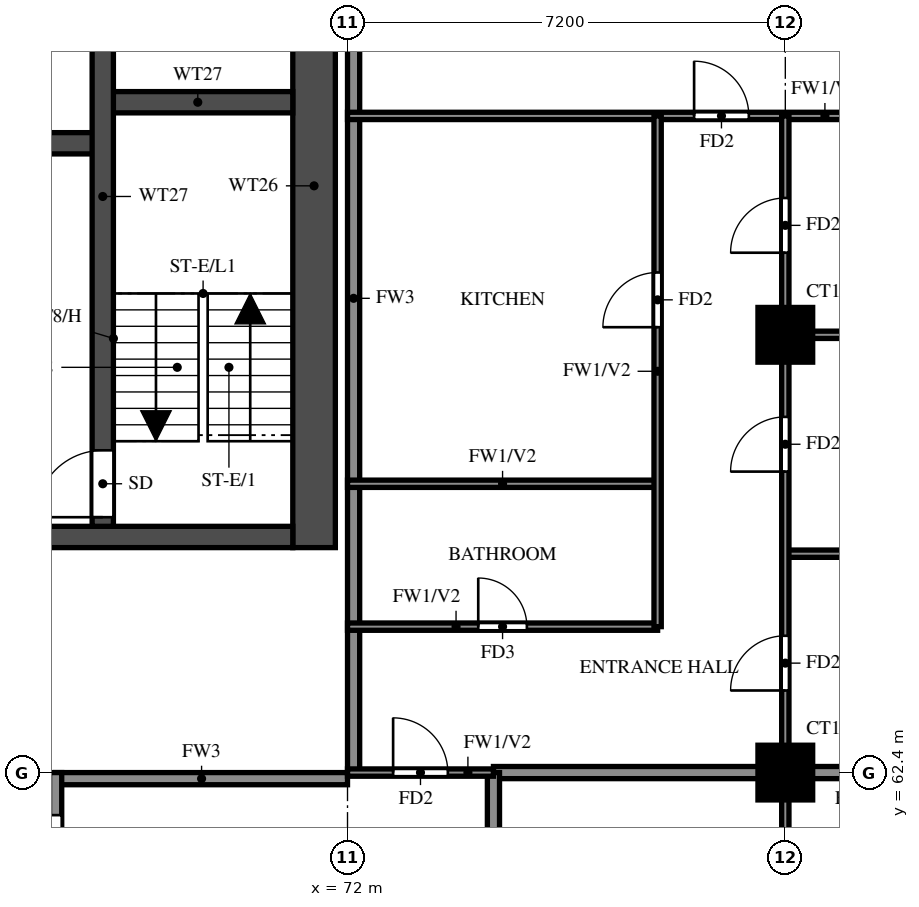
"""IFC4 building model, lengths in metres.
Left out: names, types, materials, properties, quantities, classifications, styles, units other than length and angle.
Written with IfcOpenShell. Run it as: python <this file> out.ifc"""

import sys

from ifc_helpers import new_model, si_unit, direction, frame, frame_2d, origin, origin_2d, place, context, subcontext, project, spatial, rectangle, extrude, source, transform, mapped, element, fill, save


model = new_model("IFC4")
c1 = context("Model", 3, precision=1e-05, world=origin(), true_north=direction((0.0, 1.0)))
c2 = subcontext(c1, "Body", "Model", "MODEL_VIEW")
j1 = project(units=[si_unit("LENGTHUNIT", "METRE"), si_unit("PLANEANGLEUNIT", "RADIAN")], contexts=[c1])
p1 = place(None, origin())
s1 = spatial("IfcSite", under=j1, at=p1, CompositionType="ELEMENT")
p2 = place(p1, origin())
s2 = spatial("IfcBuilding", under=s1, at=p2, CompositionType="ELEMENT")
p3 = place(p2, frame((0.0, 0.0, 192.0)))
s3 = spatial("IfcBuildingStorey", under=s2, at=p3, CompositionType="ELEMENT", Elevation=192.0)
m1 = source(origin(), c2, "Body", "SweptSolid", [
    extrude(rectangle(XDim=0.9, YDim=0.9, at=origin_2d()), origin(), (0.0, 0.0, 1.0), 3.2),
])
for number, where, z_axis, x_axis in (
    (1, (79.2, 62.4, 0.0), (0.0, 0.0, 1.0), (1.0, 0.0, 0.0)),
    (2, (79.2, 69.6, 0.0), (0.0, 0.0, 1.0), (1.0, 0.0, 0.0)),
):
    element("IfcColumn", number, at=place(p3, frame(where, z_axis=z_axis, x_axis=x_axis)), inside=s3, PredefinedType="COLUMN", context=c2, shape_type="MappedRepresentation", body=[
        mapped(m1, transform((0.0, 0.0, 0.0))),
    ])
p4 = place(p3, frame((71.45, 66.1, 0.0), z_axis=(0.0, 0.0, 1.0), x_axis=(0.0, 1.0, 0.0)))
e3 = element("IfcWall", 3, at=p4, inside=s3, PredefinedType="SHEAR", context=c2, shape_type="SweptSolid", body=[
    extrude(rectangle(XDim=11.9, YDim=0.7, at=frame_2d((5.95, 0.0))), origin(), (0.0, 0.0, 1.0), 3.2),
])
p5 = place(p3, frame((29.7, 66.275, 0.0), z_axis=(0.0, 0.0, 1.0), x_axis=(1.0, 0.0, 0.0)))
e4 = element("IfcWall", 4, at=p5, inside=s3, PredefinedType="SHEAR", context=c2, shape_type="SweptSolid", body=[
    extrude(rectangle(XDim=41.4, YDim=0.35, at=frame_2d((20.7, 0.0))), origin(), (0.0, 0.0, 1.0), 3.2),
])
p6 = place(p5, frame((0.925, 0.0, 0.0)))
e5 = element("IfcOpeningElement", 5, at=p6, cuts=e4, PredefinedType="OPENING", context=c2, shape_type="SweptSolid", body=[
    extrude(rectangle(XDim=1.1, YDim=2.1, at=frame_2d((0.55, 1.05))), frame((0.0, 0.185, 0.0), z_axis=(0.0, -1.0, 0.0), x_axis=(1.0, 0.0, 0.0)), (0.0, 0.0, 1.0), 0.37),
])
p7 = place(p5, frame((3.712, 0.0, 0.0)))
e6 = element("IfcOpeningElement", 6, at=p7, cuts=e4, PredefinedType="OPENING", context=c2, shape_type="SweptSolid", body=[
    extrude(rectangle(XDim=1.8, YDim=2.1, at=frame_2d((0.9, 1.05))), frame((0.0, 0.185, 0.0), z_axis=(0.0, -1.0, 0.0), x_axis=(1.0, 0.0, 0.0)), (0.0, 0.0, 1.0), 0.37),
])
p8 = place(p3, frame((32.825, 72.75, 0.0), z_axis=(0.0, 0.0, 1.0), x_axis=(1.0, 0.0, 0.0)))
e7 = element("IfcWall", 7, at=p8, inside=s3, PredefinedType="SHEAR", context=c2, shape_type="SweptSolid", body=[
    extrude(rectangle(XDim=35.15, YDim=0.35, at=frame_2d((17.575, 0.0))), origin(), (0.0, 0.0, 1.0), 3.2),
])
p9 = place(p8, frame((19.8, 0.0, 0.0)))
e8 = element("IfcOpeningElement", 8, at=p9, cuts=e7, PredefinedType="OPENING", context=c2, shape_type="SweptSolid", body=[
    extrude(rectangle(XDim=1.1, YDim=2.1, at=frame_2d((0.55, 1.05))), frame((0.0, 0.185, 0.0), z_axis=(0.0, -1.0, 0.0), x_axis=(1.0, 0.0, 0.0)), (0.0, 0.0, 1.0), 0.37),
])
p10 = place(p8, frame((27.7, 0.0, 0.0)))
e9 = element("IfcOpeningElement", 9, at=p10, cuts=e7, PredefinedType="OPENING", context=c2, shape_type="SweptSolid", body=[
    extrude(rectangle(XDim=1.1, YDim=2.1, at=frame_2d((0.55, 1.05))), frame((0.0, 0.185, 0.0), z_axis=(0.0, -1.0, 0.0), x_axis=(1.0, 0.0, 0.0)), (0.0, 0.0, 1.0), 0.37),
])
p11 = place(p8, frame((30.3, 0.0, 0.0)))
e10 = element("IfcOpeningElement", 10, at=p11, cuts=e7, PredefinedType="OPENING", context=c2, shape_type="SweptSolid", body=[
    extrude(rectangle(XDim=1.1, YDim=2.1, at=frame_2d((0.55, 1.05))), frame((0.0, 0.185, 0.0), z_axis=(0.0, -1.0, 0.0), x_axis=(1.0, 0.0, 0.0)), (0.0, 0.0, 1.0), 0.37),
])
p12 = place(p8, frame((3.8, 0.0, 0.0)))
e11 = element("IfcOpeningElement", 11, at=p12, cuts=e7, PredefinedType="OPENING", context=c2, shape_type="SweptSolid", body=[
    extrude(rectangle(XDim=1.1, YDim=2.1, at=frame_2d((0.55, 1.05))), frame((0.0, 0.185, 0.0), z_axis=(0.0, -1.0, 0.0), x_axis=(1.0, 0.0, 0.0)), (0.0, 0.0, 1.0), 0.37),
])
p13 = place(p8, frame((6.55, 0.0, 0.0)))
e12 = element("IfcOpeningElement", 12, at=p13, cuts=e7, PredefinedType="OPENING", context=c2, shape_type="SweptSolid", body=[
    extrude(rectangle(XDim=1.1, YDim=2.1, at=frame_2d((0.55, 1.05))), frame((0.0, 0.185, 0.0), z_axis=(0.0, -1.0, 0.0), x_axis=(1.0, 0.0, 0.0)), (0.0, 0.0, 1.0), 0.37),
])
p14 = place(p8, frame((9.3, 0.0, 0.0)))
e13 = element("IfcOpeningElement", 13, at=p14, cuts=e7, PredefinedType="OPENING", context=c2, shape_type="SweptSolid", body=[
    extrude(rectangle(XDim=1.1, YDim=2.1, at=frame_2d((0.55, 1.05))), frame((0.0, 0.185, 0.0), z_axis=(0.0, -1.0, 0.0), x_axis=(1.0, 0.0, 0.0)), (0.0, 0.0, 1.0), 0.37),
])
p15 = place(p8, frame((12.05, 0.0, 0.0)))
e14 = element("IfcOpeningElement", 14, at=p15, cuts=e7, PredefinedType="OPENING", context=c2, shape_type="SweptSolid", body=[
    extrude(rectangle(XDim=1.1, YDim=2.1, at=frame_2d((0.55, 1.05))), frame((0.0, 0.185, 0.0), z_axis=(0.0, -1.0, 0.0), x_axis=(1.0, 0.0, 0.0)), (0.0, 0.0, 1.0), 0.37),
])
p16 = place(p8, frame((14.8, 0.0, 0.0)))
e15 = element("IfcOpeningElement", 15, at=p16, cuts=e7, PredefinedType="OPENING", context=c2, shape_type="SweptSolid", body=[
    extrude(rectangle(XDim=1.1, YDim=2.1, at=frame_2d((0.55, 1.05))), frame((0.0, 0.185, 0.0), z_axis=(0.0, -1.0, 0.0), x_axis=(1.0, 0.0, 0.0)), (0.0, 0.0, 1.0), 0.37),
])
p17 = place(p8, frame((17.55, 0.0, 0.0)))
e16 = element("IfcOpeningElement", 16, at=p17, cuts=e7, PredefinedType="OPENING", context=c2, shape_type="SweptSolid", body=[
    extrude(rectangle(XDim=1.1, YDim=2.1, at=frame_2d((0.55, 1.05))), frame((0.0, 0.185, 0.0), z_axis=(0.0, -1.0, 0.0), x_axis=(1.0, 0.0, 0.0)), (0.0, 0.0, 1.0), 0.37),
])
p18 = place(p8, frame((0.938, 0.0, 0.0)))
e17 = element("IfcOpeningElement", 17, at=p18, cuts=e7, PredefinedType="OPENING", context=c2, shape_type="SweptSolid", body=[
    extrude(rectangle(XDim=1.1, YDim=2.1, at=frame_2d((0.55, 1.05))), frame((0.0, 0.185, 0.0), z_axis=(0.0, -1.0, 0.0), x_axis=(1.0, 0.0, 0.0)), (0.0, 0.0, 1.0), 0.37),
])
p19 = place(p3, frame((67.975, 73.425, 0.0), z_axis=(0.0, 0.0, 1.0), x_axis=(1.0, 0.0, 0.0)))
e18 = element("IfcWall", 18, at=p19, inside=s3, PredefinedType="SHEAR", context=c2, shape_type="SweptSolid", body=[
    extrude(rectangle(XDim=3.125, YDim=0.35, at=frame_2d((1.562, 0.0))), origin(), (0.0, 0.0, 1.0), 3.2),
])
p20 = place(p3, frame((67.975, 66.45, 0.0), z_axis=(0.0, 0.0, 1.0), x_axis=(0.0, 1.0, 0.0)))
e19 = element("IfcWall", 19, at=p20, inside=s3, PredefinedType="SHEAR", context=c2, shape_type="SweptSolid", body=[
    extrude(rectangle(XDim=10.85, YDim=0.35, at=frame_2d((5.425, 0.0))), origin(), (0.0, 0.0, 1.0), 3.2),
])
p21 = place(p20, frame((0.15, 0.0, 0.0)))
e20 = element("IfcOpeningElement", 20, at=p21, cuts=e19, PredefinedType="OPENING", context=c2, shape_type="SweptSolid", body=[
    extrude(rectangle(XDim=1.1, YDim=2.1, at=frame_2d((0.55, 1.05))), frame((0.0, 0.185, 0.0), z_axis=(0.0, -1.0, 0.0), x_axis=(1.0, 0.0, 0.0)), (0.0, 0.0, 1.0), 0.37),
])
p22 = place(p3, frame((67.2, 62.3, 0.0), z_axis=(0.0, 0.0, 1.0), x_axis=(1.0, 0.0, 0.0)))
e21 = element("IfcWall", 21, at=p22, inside=s3, PredefinedType="SOLIDWALL", context=c2, shape_type="SweptSolid", body=[
    extrude(rectangle(XDim=4.8, YDim=0.2, at=frame_2d((2.4, 0.0))), origin(), (0.0, 0.0, 1.0), 3.2),
])
p23 = place(p3, frame((67.2, 45.6, 0.0), z_axis=(0.0, 0.0, 1.0), x_axis=(0.0, 1.0, 0.0)))
e22 = element("IfcWall", 22, at=p23, inside=s3, PredefinedType="SOLIDWALL", context=c2, shape_type="SweptSolid", body=[
    extrude(rectangle(XDim=16.8, YDim=0.2, at=frame_2d((8.4, 0.0))), origin(), (0.0, 0.0, 1.0), 3.2),
])
p24 = place(p23, frame((8.3, 0.0, 0.0)))
e23 = element("IfcOpeningElement", 23, at=p24, cuts=e22, PredefinedType="OPENING", context=c2, shape_type="SweptSolid", body=[
    extrude(rectangle(XDim=1.0, YDim=2.1, at=frame_2d((0.5, 1.05))), frame((0.0, 0.11, 0.0), z_axis=(0.0, -1.0, 0.0), x_axis=(1.0, 0.0, 0.0)), (0.0, 0.0, 1.0), 0.22),
])
p25 = place(p23, frame((15.1, 0.0, 0.0)))
e24 = element("IfcOpeningElement", 24, at=p25, cuts=e22, PredefinedType="OPENING", context=c2, shape_type="SweptSolid", body=[
    extrude(rectangle(XDim=1.0, YDim=2.1, at=frame_2d((0.5, 1.05))), frame((0.0, 0.11, 0.0), z_axis=(0.0, -1.0, 0.0), x_axis=(1.0, 0.0, 0.0)), (0.0, 0.0, 1.0), 0.22),
])
p26 = place(p23, frame((0.7, 0.0, 0.0)))
e25 = element("IfcOpeningElement", 25, at=p26, cuts=e22, PredefinedType="OPENING", context=c2, shape_type="SweptSolid", body=[
    extrude(rectangle(XDim=1.0, YDim=2.1, at=frame_2d((0.5, 1.05))), frame((0.0, 0.11, 0.0), z_axis=(0.0, -1.0, 0.0), x_axis=(1.0, 0.0, 0.0)), (0.0, 0.0, 1.0), 0.22),
])
p27 = place(p3, frame((72.1, 62.4, 0.0), z_axis=(0.0, 0.0, 1.0), x_axis=(0.0, 1.0, 0.0)))
e26 = element("IfcWall", 26, at=p27, inside=s3, PredefinedType="SOLIDWALL", context=c2, shape_type="SweptSolid", body=[
    extrude(rectangle(XDim=15.6, YDim=0.2, at=frame_2d((7.8, 0.0))), origin(), (0.0, 0.0, 1.0), 3.2),
])
p28 = place(p3, frame((74.4, 62.4, 0.0), z_axis=(0.0, 0.0, 1.0), x_axis=(1.0, 0.0, 0.0)))
e27 = element("IfcWall", 27, at=p28, inside=s3, PredefinedType="SOLIDWALL", context=c2, shape_type="SweptSolid", body=[
    extrude(rectangle(XDim=11.875, YDim=0.2, at=frame_2d((5.938, 0.0))), origin(), (0.0, 0.0, 1.0), 3.2),
])
p29 = place(p3, frame((74.4, 60.0, 0.0), z_axis=(0.0, 0.0, 1.0), x_axis=(0.0, 1.0, 0.0)))
e28 = element("IfcWall", 28, at=p29, inside=s3, PredefinedType="SOLIDWALL", context=c2, shape_type="SweptSolid", body=[
    extrude(rectangle(XDim=2.4, YDim=0.2, at=frame_2d((1.2, 0.0))), origin(), (0.0, 0.0, 1.0), 3.2),
])
p30 = place(p3, frame((72.0, 62.4, 0.0), z_axis=(0.0, 0.0, 1.0), x_axis=(1.0, 0.0, 0.0)))
e29 = element("IfcWall", 29, at=p30, inside=s3, PredefinedType="PARTITIONING", context=c2, shape_type="SweptSolid", body=[
    extrude(rectangle(XDim=2.4, YDim=0.12, at=frame_2d((1.2, 0.0))), origin(), (0.0, 0.0, 1.0), 3.2),
])
p31 = place(p30, frame((0.75, 0.0, 0.0)))
e30 = element("IfcOpeningElement", 30, at=p31, cuts=e29, PredefinedType="OPENING", context=c2, shape_type="SweptSolid", body=[
    extrude(rectangle(XDim=0.9, YDim=2.1, at=frame_2d((0.45, 1.05))), frame((0.0, 0.07, 0.0), z_axis=(0.0, -1.0, 0.0), x_axis=(1.0, 0.0, 0.0)), (0.0, 0.0, 1.0), 0.14),
])
p32 = place(p3, frame((72.0, 64.8, 0.0), z_axis=(0.0, 0.0, 1.0), x_axis=(1.0, 0.0, 0.0)))
e31 = element("IfcWall", 31, at=p32, inside=s3, PredefinedType="PARTITIONING", context=c2, shape_type="SweptSolid", body=[
    extrude(rectangle(XDim=5.1, YDim=0.12, at=frame_2d((2.55, 0.0))), origin(), (0.0, 0.0, 1.0), 3.2),
])
p33 = place(p32, frame((2.15, 0.0, 0.0)))
e32 = element("IfcOpeningElement", 32, at=p33, cuts=e31, PredefinedType="OPENING", context=c2, shape_type="SweptSolid", body=[
    extrude(rectangle(XDim=0.8, YDim=2.1, at=frame_2d((0.4, 1.05))), frame((0.0, 0.07, 0.0), z_axis=(0.0, -1.0, 0.0), x_axis=(1.0, 0.0, 0.0)), (0.0, 0.0, 1.0), 0.14),
])
p34 = place(p3, frame((79.2, 66.0, 0.0), z_axis=(0.0, 0.0, 1.0), x_axis=(1.0, 0.0, 0.0)))
e33 = element("IfcWall", 33, at=p34, inside=s3, PredefinedType="PARTITIONING", context=c2, shape_type="SweptSolid", body=[
    extrude(rectangle(XDim=7.075, YDim=0.12, at=frame_2d((3.538, 0.0))), origin(), (0.0, 0.0, 1.0), 2.3),
])
p35 = place(p3, frame((72.0, 67.15, 0.0), z_axis=(0.0, 0.0, 1.0), x_axis=(1.0, 0.0, 0.0)))
e34 = element("IfcWall", 34, at=p35, inside=s3, PredefinedType="PARTITIONING", context=c2, shape_type="SweptSolid", body=[
    extrude(rectangle(XDim=5.1, YDim=0.12, at=frame_2d((2.55, 0.0))), origin(), (0.0, 0.0, 1.0), 3.2),
])
p36 = place(p3, frame((79.2, 69.6, 0.0), z_axis=(0.0, 0.0, 1.0), x_axis=(1.0, 0.0, 0.0)))
e35 = element("IfcWall", 35, at=p36, inside=s3, PredefinedType="PARTITIONING", context=c2, shape_type="SweptSolid", body=[
    extrude(rectangle(XDim=7.075, YDim=0.12, at=frame_2d((3.538, 0.0))), origin(), (0.0, 0.0, 1.0), 3.2),
])
p37 = place(p3, frame((72.0, 73.2, 0.0), z_axis=(0.0, 0.0, 1.0), x_axis=(1.0, 0.0, 0.0)))
e36 = element("IfcWall", 36, at=p37, inside=s3, PredefinedType="PARTITIONING", context=c2, shape_type="SweptSolid", body=[
    extrude(rectangle(XDim=14.275, YDim=0.12, at=frame_2d((7.137, 0.0))), origin(), (0.0, 0.0, 1.0), 2.3),
])
p38 = place(p37, frame((5.7, 0.0, 0.0)))
e37 = element("IfcOpeningElement", 37, at=p38, cuts=e36, PredefinedType="OPENING", context=c2, shape_type="SweptSolid", body=[
    extrude(rectangle(XDim=0.9, YDim=2.1, at=frame_2d((0.45, 1.05))), frame((0.0, 0.07, 0.0), z_axis=(0.0, -1.0, 0.0), x_axis=(1.0, 0.0, 0.0)), (0.0, 0.0, 1.0), 0.14),
])
p39 = place(p3, frame((77.1, 64.8, 0.0), z_axis=(0.0, 0.0, 1.0), x_axis=(0.0, 1.0, 0.0)))
e38 = element("IfcWall", 38, at=p39, inside=s3, PredefinedType="PARTITIONING", context=c2, shape_type="SweptSolid", body=[
    extrude(rectangle(XDim=8.4, YDim=0.12, at=frame_2d((4.2, 0.0))), origin(), (0.0, 0.0, 1.0), 3.2),
])
p40 = place(p39, frame((4.925, 0.0, 0.0)))
e39 = element("IfcOpeningElement", 39, at=p40, cuts=e38, PredefinedType="OPENING", context=c2, shape_type="SweptSolid", body=[
    extrude(rectangle(XDim=0.9, YDim=2.1, at=frame_2d((0.45, 1.05))), frame((0.0, 0.07, 0.0), z_axis=(0.0, -1.0, 0.0), x_axis=(1.0, 0.0, 0.0)), (0.0, 0.0, 1.0), 0.14),
])
p41 = place(p3, frame((79.2, 48.125, 0.0), z_axis=(0.0, 0.0, 1.0), x_axis=(0.0, 1.0, 0.0)))
e40 = element("IfcWall", 40, at=p41, inside=s3, PredefinedType="PARTITIONING", context=c2, shape_type="SweptSolid", body=[
    extrude(rectangle(XDim=25.075, YDim=0.12, at=frame_2d((12.538, 0.0))), origin(), (0.0, 0.0, 1.0), 3.2),
])
p42 = place(p41, frame((1.288, 0.0, 0.0)))
e41 = element("IfcOpeningElement", 41, at=p42, cuts=e40, PredefinedType="OPENING", context=c2, shape_type="SweptSolid", body=[
    extrude(rectangle(XDim=0.9, YDim=2.1, at=frame_2d((0.45, 1.05))), frame((0.0, 0.07, 0.0), z_axis=(0.0, -1.0, 0.0), x_axis=(1.0, 0.0, 0.0)), (0.0, 0.0, 1.0), 0.14),
])
p43 = place(p41, frame((7.825, 0.0, 0.0)))
e42 = element("IfcOpeningElement", 42, at=p43, cuts=e40, PredefinedType="OPENING", context=c2, shape_type="SweptSolid", body=[
    extrude(rectangle(XDim=1.5, YDim=2.1, at=frame_2d((0.75, 1.05))), frame((0.0, 0.07, 0.0), z_axis=(0.0, -1.0, 0.0), x_axis=(1.0, 0.0, 0.0)), (0.0, 0.0, 1.0), 0.14),
])
p44 = place(p41, frame((12.025, 0.0, 0.0)))
e43 = element("IfcOpeningElement", 43, at=p44, cuts=e40, PredefinedType="OPENING", context=c2, shape_type="SweptSolid", body=[
    extrude(rectangle(XDim=0.9, YDim=2.1, at=frame_2d((0.45, 1.05))), frame((0.0, 0.07, 0.0), z_axis=(0.0, -1.0, 0.0), x_axis=(1.0, 0.0, 0.0)), (0.0, 0.0, 1.0), 0.14),
])
p45 = place(p41, frame((15.625, 0.0, 0.0)))
e44 = element("IfcOpeningElement", 44, at=p45, cuts=e40, PredefinedType="OPENING", context=c2, shape_type="SweptSolid", body=[
    extrude(rectangle(XDim=0.9, YDim=2.1, at=frame_2d((0.45, 1.05))), frame((0.0, 0.07, 0.0), z_axis=(0.0, -1.0, 0.0), x_axis=(1.0, 0.0, 0.0)), (0.0, 0.0, 1.0), 0.14),
])
p46 = place(p41, frame((19.225, 0.0, 0.0)))
e45 = element("IfcOpeningElement", 45, at=p46, cuts=e40, PredefinedType="OPENING", context=c2, shape_type="SweptSolid", body=[
    extrude(rectangle(XDim=0.9, YDim=2.1, at=frame_2d((0.45, 1.05))), frame((0.0, 0.07, 0.0), z_axis=(0.0, -1.0, 0.0), x_axis=(1.0, 0.0, 0.0)), (0.0, 0.0, 1.0), 0.14),
])
p47 = place(p41, frame((22.825, 0.0, 0.0)))
e46 = element("IfcOpeningElement", 46, at=p47, cuts=e40, PredefinedType="OPENING", context=c2, shape_type="SweptSolid", body=[
    extrude(rectangle(XDim=0.9, YDim=2.1, at=frame_2d((0.45, 1.05))), frame((0.0, 0.07, 0.0), z_axis=(0.0, -1.0, 0.0), x_axis=(1.0, 0.0, 0.0)), (0.0, 0.0, 1.0), 0.14),
])
p48 = place(p21, origin())
e47 = element("IfcDoor", 47, at=p48, inside=s3, OperationType="SINGLE_SWING_LEFT", PredefinedType="DOOR", context=c2, shape_type="SweptSolid", body=[
    extrude(rectangle(XDim=1.1, YDim=2.1, at=frame_2d((0.55, 1.05))), frame((0.0, 0.025, 0.0), z_axis=(0.0, -1.0, 0.0), x_axis=(1.0, 0.0, 0.0)), (0.0, 0.0, 1.0), 0.05),
])
fill(e20, e47)
p49 = place(p31, origin())
e48 = element("IfcDoor", 48, at=p49, inside=s3, OperationType="SINGLE_SWING_RIGHT", PredefinedType="DOOR", context=c2, shape_type="SweptSolid", body=[
    extrude(rectangle(XDim=0.9, YDim=2.1, at=frame_2d((0.45, 1.05))), frame((0.0, 0.025, 0.0), z_axis=(0.0, -1.0, 0.0), x_axis=(1.0, 0.0, 0.0)), (0.0, 0.0, 1.0), 0.05),
])
fill(e30, e48)
p50 = place(p25, origin())
e49 = element("IfcDoor", 49, at=p50, inside=s3, OperationType="SINGLE_SWING_LEFT", PredefinedType="DOOR", context=c2, shape_type="SweptSolid", body=[
    extrude(rectangle(XDim=1.0, YDim=2.1, at=frame_2d((0.5, 1.05))), frame((0.0, 0.025, 0.0), z_axis=(0.0, -1.0, 0.0), x_axis=(1.0, 0.0, 0.0)), (0.0, 0.0, 1.0), 0.05),
])
fill(e24, e49)
p51 = place(p45, origin())
e50 = element("IfcDoor", 50, at=p51, inside=s3, OperationType="SINGLE_SWING_LEFT", PredefinedType="DOOR", context=c2, shape_type="SweptSolid", body=[
    extrude(rectangle(XDim=0.9, YDim=2.1, at=frame_2d((0.45, 1.05))), frame((0.0, 0.025, 0.0), z_axis=(0.0, -1.0, 0.0), x_axis=(1.0, 0.0, 0.0)), (0.0, 0.0, 1.0), 0.05),
])
fill(e44, e50)
p52 = place(p46, origin())
e51 = element("IfcDoor", 51, at=p52, inside=s3, OperationType="SINGLE_SWING_RIGHT", PredefinedType="DOOR", context=c2, shape_type="SweptSolid", body=[
    extrude(rectangle(XDim=0.9, YDim=2.1, at=frame_2d((0.45, 1.05))), frame((0.0, 0.025, 0.0), z_axis=(0.0, -1.0, 0.0), x_axis=(1.0, 0.0, 0.0)), (0.0, 0.0, 1.0), 0.05),
])
fill(e45, e51)
p53 = place(p47, origin())
e52 = element("IfcDoor", 52, at=p53, inside=s3, OperationType="SINGLE_SWING_LEFT", PredefinedType="DOOR", context=c2, shape_type="SweptSolid", body=[
    extrude(rectangle(XDim=0.9, YDim=2.1, at=frame_2d((0.45, 1.05))), frame((0.0, 0.025, 0.0), z_axis=(0.0, -1.0, 0.0), x_axis=(1.0, 0.0, 0.0)), (0.0, 0.0, 1.0), 0.05),
])
fill(e46, e52)
p54 = place(p38, origin())
e53 = element("IfcDoor", 53, at=p54, inside=s3, OperationType="SINGLE_SWING_LEFT", PredefinedType="DOOR", context=c2, shape_type="SweptSolid", body=[
    extrude(rectangle(XDim=0.9, YDim=2.1, at=frame_2d((0.45, 1.05))), frame((0.0, 0.025, 0.0), z_axis=(0.0, -1.0, 0.0), x_axis=(1.0, 0.0, 0.0)), (0.0, 0.0, 1.0), 0.05),
])
fill(e37, e53)
p55 = place(p33, origin())
e54 = element("IfcDoor", 54, at=p55, inside=s3, OperationType="SINGLE_SWING_RIGHT", PredefinedType="DOOR", context=c2, shape_type="SweptSolid", body=[
    extrude(rectangle(XDim=0.8, YDim=2.1, at=frame_2d((0.4, 1.05))), frame((0.0, 0.025, 0.0), z_axis=(0.0, -1.0, 0.0), x_axis=(1.0, 0.0, 0.0)), (0.0, 0.0, 1.0), 0.05),
])
fill(e32, e54)
p56 = place(p40, origin())
e55 = element("IfcDoor", 55, at=p56, inside=s3, OperationType="SINGLE_SWING_LEFT", PredefinedType="DOOR", context=c2, shape_type="SweptSolid", body=[
    extrude(rectangle(XDim=0.9, YDim=2.1, at=frame_2d((0.45, 1.05))), frame((0.0, 0.025, 0.0), z_axis=(0.0, -1.0, 0.0), x_axis=(1.0, 0.0, 0.0)), (0.0, 0.0, 1.0), 0.05),
])
fill(e39, e55)
save(model, sys.argv[1])
